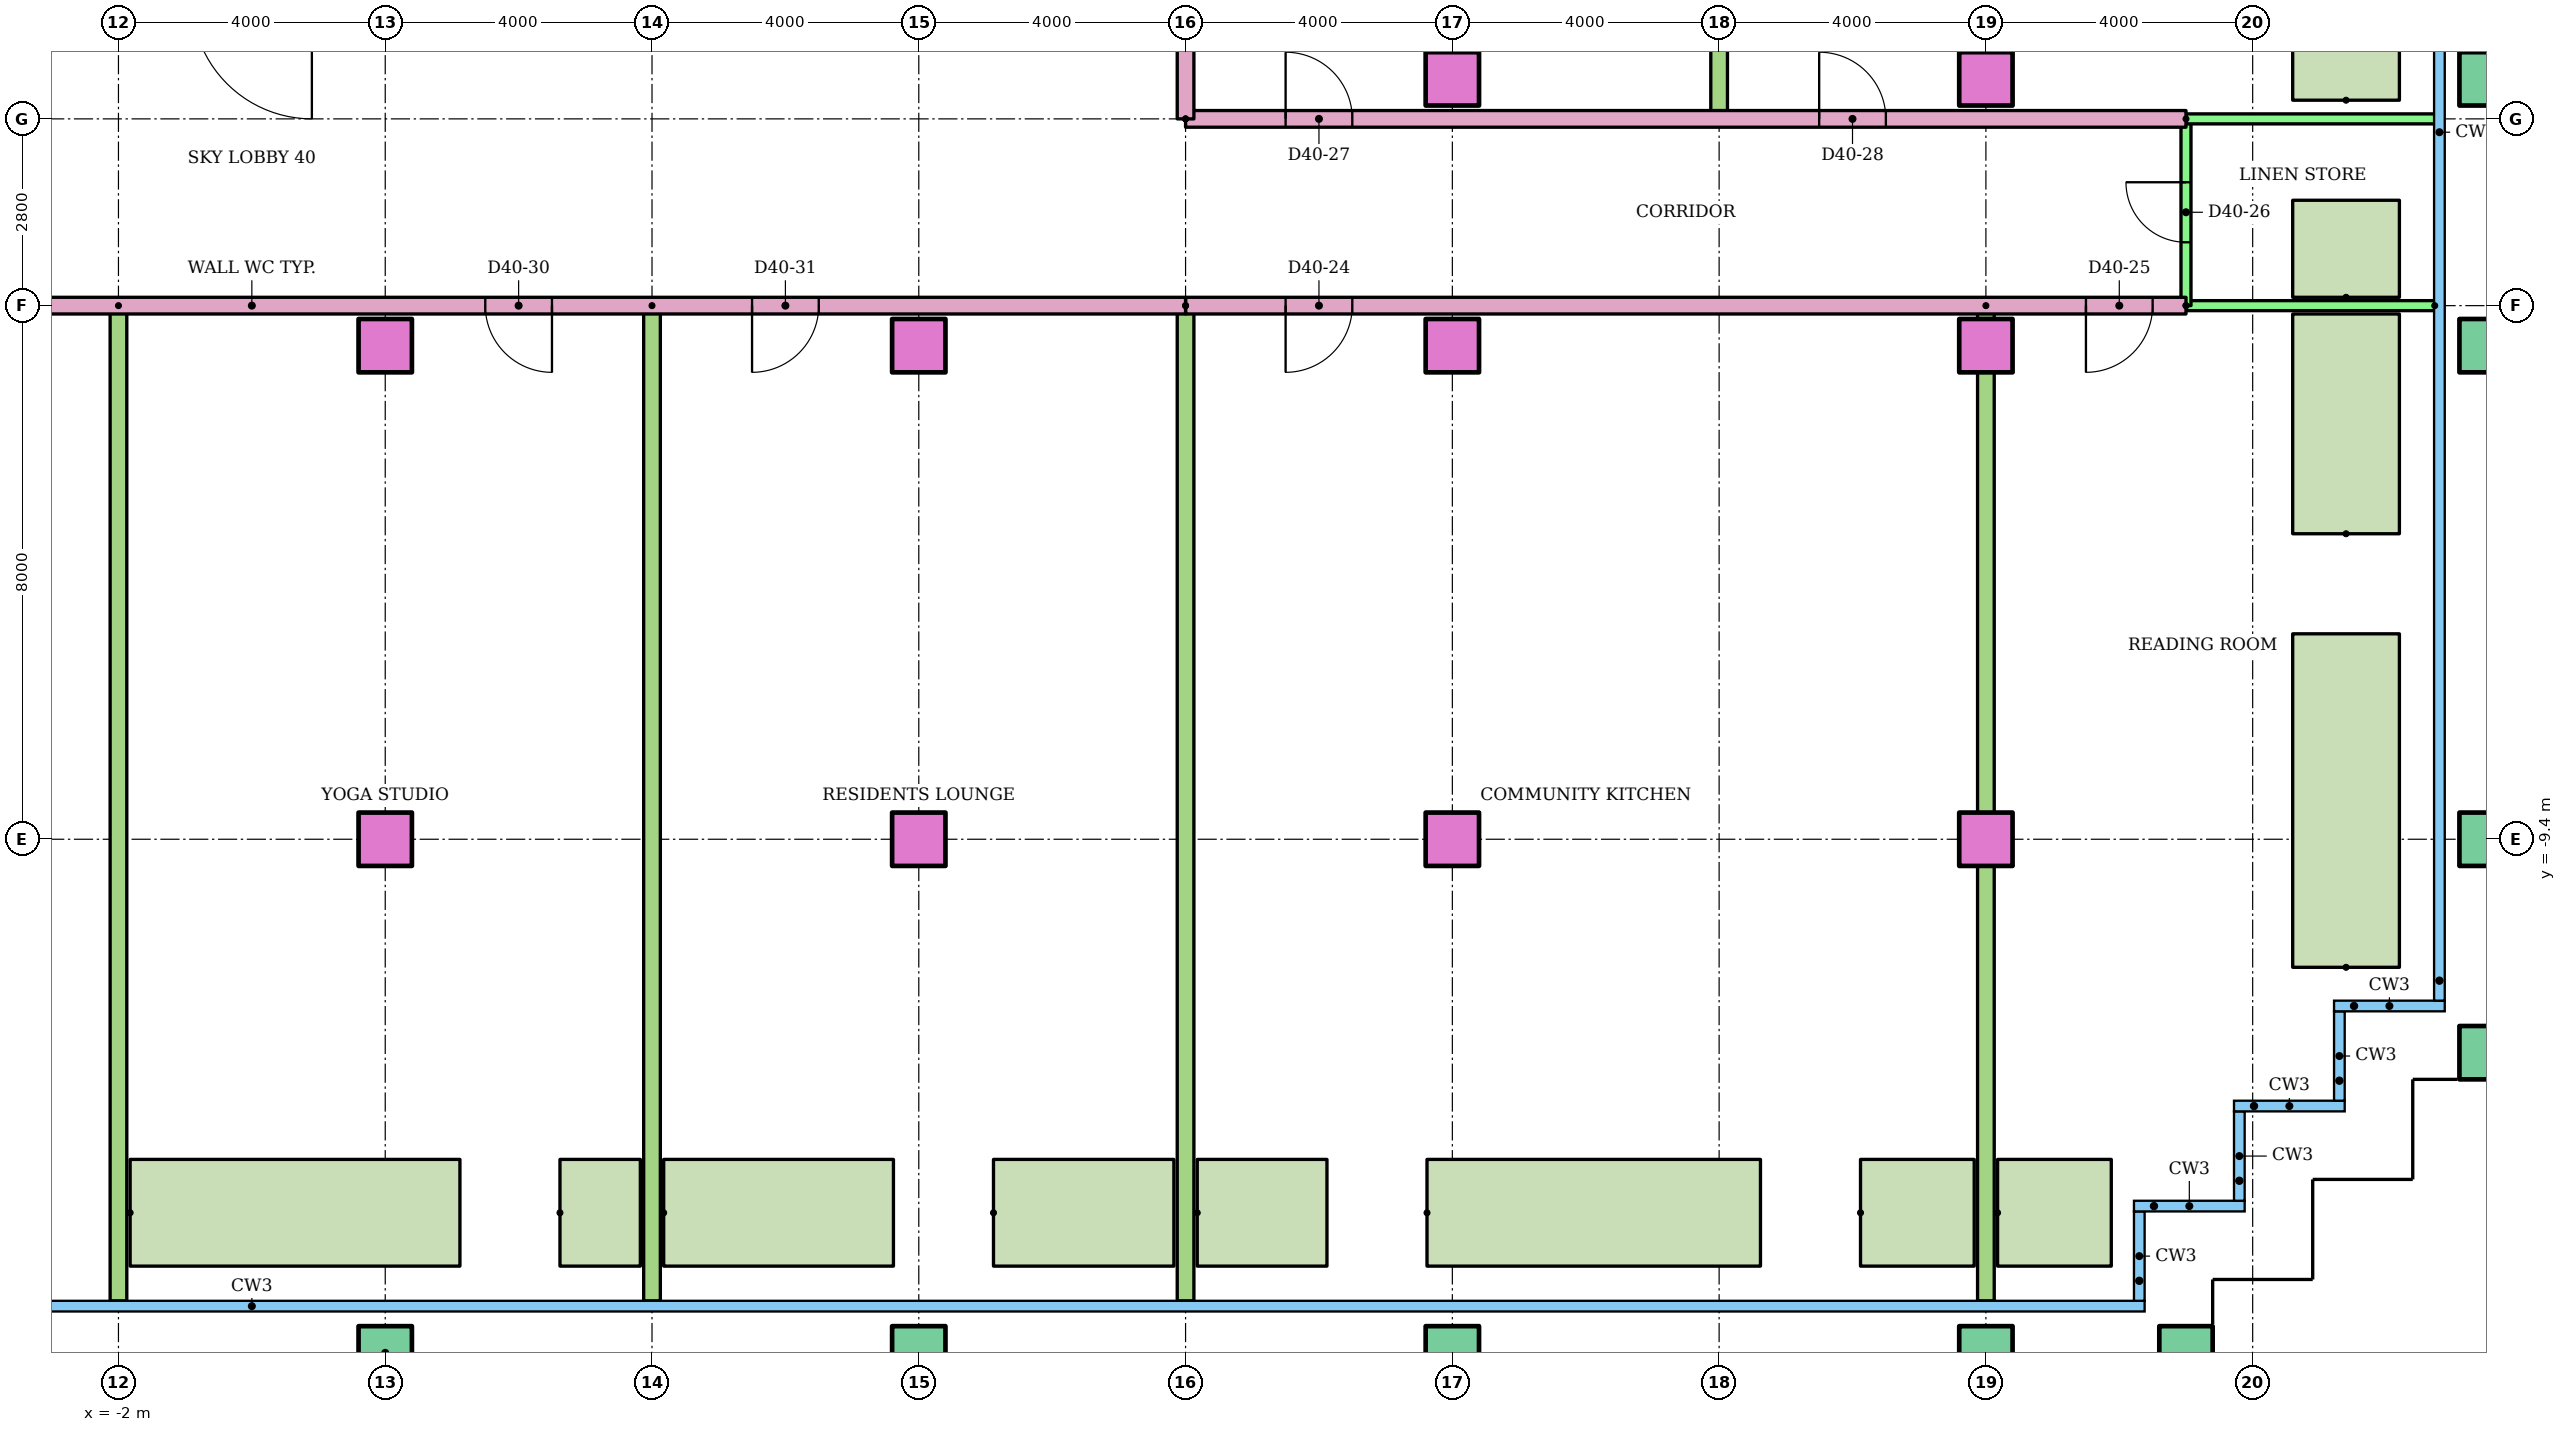
"""IFC4 building model, lengths in metres.
Left out: names, types, materials, properties, quantities, classifications, styles, units other than length and angle.
Written with IfcOpenShell. Run it as: python <this file> out.ifc"""

import sys

from ifc_helpers import new_model, si_unit, direction, frame, frame_2d, origin, origin_2d, place, context, subcontext, project, spatial, rectangle, hollow_rectangle, extrude, element, fill, save


model = new_model("IFC4")
c1 = context("Model", 3, precision=1e-05, world=origin(), true_north=direction((0.0, 1.0)))
c2 = subcontext(c1, "Body", "Model", "MODEL_VIEW")
j1 = project(units=[si_unit("LENGTHUNIT", "METRE"), si_unit("PLANEANGLEUNIT", "RADIAN")], contexts=[c1])
p1 = place(None, origin())
s1 = spatial("IfcSite", under=j1, at=p1, CompositionType="ELEMENT")
p2 = place(p1, origin())
s2 = spatial("IfcBuilding", under=s1, at=p2, CompositionType="ELEMENT")
p3 = place(p2, frame((0.0, 0.0, 151.8)))
s3 = spatial("IfcBuildingStorey", under=s2, at=p3, CompositionType="ELEMENT", Elevation=151.8)
for number, where in (
    (1, (2.0, -17.1, 0.0)),
    (2, (10.0, -17.1, 0.0)),
    (3, (18.0, -17.1, 0.0)),
    (4, (26.0, -17.1, 0.0)),
):
    element("IfcColumn", number, at=place(p3, frame(where)), inside=s3, PredefinedType="COLUMN", context=c2, shape_type="SweptSolid", body=[
        extrude(hollow_rectangle(XDim=0.8, YDim=0.8, WallThickness=0.04, at=origin_2d()), origin(), (0.0, 0.0, 1.0), 9.6),
    ])
for number, where in (
    (5, (29.0, -17.1, 0.0)),
    (6, (33.5, -12.6, 0.0)),
):
    element("IfcColumn", number, at=place(p3, frame(where)), inside=s3, PredefinedType="COLUMN", context=c2, shape_type="SweptSolid", body=[
        extrude(hollow_rectangle(XDim=0.8, YDim=0.8, WallThickness=0.04, at=origin_2d()), origin(), (0.0, 0.0, 1.0), 8.8),
    ])
for number, where in (
    (7, (2.0, -9.4, 0.0)),
    (8, (10.0, -9.4, 0.0)),
    (9, (18.0, -9.4, 0.0)),
    (10, (26.0, -9.4, 0.0)),
):
    element("IfcColumn", number, at=place(p3, frame(where)), inside=s3, PredefinedType="COLUMN", context=c2, shape_type="SweptSolid", body=[
        extrude(rectangle(XDim=0.8, YDim=0.8, at=origin_2d()), origin(), (0.0, 0.0, 1.0), 9.6),
    ])
p4 = place(p3, frame((33.5, -9.4, 0.0)))
e11 = element("IfcColumn", 11, at=p4, inside=s3, PredefinedType="COLUMN", context=c2, shape_type="SweptSolid", body=[
    extrude(hollow_rectangle(XDim=0.8, YDim=0.8, WallThickness=0.04, at=origin_2d()), origin(), (0.0, 0.0, 1.0), 8.8),
])
for number, where in (
    (12, (2.0, -2.0, 0.0)),
    (13, (10.0, -2.0, 0.0)),
    (14, (18.0, -2.0, 0.0)),
    (15, (26.0, -2.0, 0.0)),
):
    element("IfcColumn", number, at=place(p3, frame(where)), inside=s3, PredefinedType="COLUMN", context=c2, shape_type="SweptSolid", body=[
        extrude(rectangle(XDim=0.8, YDim=0.8, at=origin_2d()), origin(), (0.0, 0.0, 1.0), 9.6),
    ])
p5 = place(p3, frame((33.5, -2.0, 0.0)))
e16 = element("IfcColumn", 16, at=p5, inside=s3, PredefinedType="COLUMN", context=c2, shape_type="SweptSolid", body=[
    extrude(hollow_rectangle(XDim=0.8, YDim=0.8, WallThickness=0.04, at=origin_2d()), origin(), (0.0, 0.0, 1.0), 8.8),
])
for number, where in (
    (17, (18.0, 2.0, 0.0)),
    (18, (26.0, 2.0, 0.0)),
):
    element("IfcColumn", number, at=place(p3, frame(where)), inside=s3, PredefinedType="COLUMN", context=c2, shape_type="SweptSolid", body=[
        extrude(rectangle(XDim=0.8, YDim=0.8, at=origin_2d()), origin(), (0.0, 0.0, 1.0), 9.6),
    ])
p6 = place(p3, frame((33.5, 2.0, 0.0)))
e19 = element("IfcColumn", 19, at=p6, inside=s3, PredefinedType="COLUMN", context=c2, shape_type="SweptSolid", body=[
    extrude(hollow_rectangle(XDim=0.8, YDim=0.8, WallThickness=0.04, at=origin_2d()), origin(), (0.0, 0.0, 1.0), 8.8),
])
p7 = place(p3, frame((17.62, -15.0, 0.0)))
e20 = element("IfcWall", 20, at=p7, inside=s3, PredefinedType="STANDARD", context=c2, shape_type="SweptSolid", body=[
    extrude(rectangle(XDim=5.0, YDim=1.6, at=frame_2d((2.5, 0.0))), origin(), (0.0, 0.0, 1.0), 0.8),
])
for number, where, z_axis, x_axis in (
    (21, (31.4, -11.32, 0.0), (0.0, 0.0, 1.0), (0.0, 1.0, 0.0)),
    (22, (31.4, 1.68, 0.0), (0.0, 0.0, 1.0), (0.0, 1.0, 0.0)),
):
    element("IfcWall", number, at=place(p3, frame(where, z_axis=z_axis, x_axis=x_axis)), inside=s3, PredefinedType="STANDARD", context=c2, shape_type="SweptSolid", body=[
        extrude(rectangle(XDim=5.0, YDim=1.6, at=frame_2d((2.5, 0.0))), origin(), (0.0, 0.0, 1.0), 0.8),
    ])
p8 = place(p3, frame((29.0, -1.4, 0.0), z_axis=(0.0, 0.0, 1.0), x_axis=(-1.0, 0.0, 0.0)))
e23 = element("IfcWall", 23, at=p8, inside=s3, PredefinedType="PARTITIONING", context=c2, shape_type="SweptSolid", body=[
    extrude(rectangle(XDim=15.0, YDim=0.25, at=frame_2d((7.5, 0.0))), origin(), (0.0, 0.0, 1.0), 8.8),
])
p9 = place(p8, frame((12.5, 0.0, 0.0)))
e24 = element("IfcOpeningElement", 24, at=p9, cuts=e23, PredefinedType="OPENING", context=c2, shape_type="SweptSolid", body=[
    extrude(rectangle(XDim=1.0, YDim=2.1, at=frame_2d((0.5, 1.05))), frame((0.0, 0.135, 0.0), z_axis=(0.0, -1.0, 0.0), x_axis=(1.0, 0.0, 0.0)), (0.0, 0.0, 1.0), 0.27),
])
p10 = place(p8, frame((0.5, 0.0, 0.0)))
e25 = element("IfcOpeningElement", 25, at=p10, cuts=e23, PredefinedType="OPENING", context=c2, shape_type="SweptSolid", body=[
    extrude(rectangle(XDim=1.0, YDim=2.1, at=frame_2d((0.5, 1.05))), frame((0.0, 0.135, 0.0), z_axis=(0.0, -1.0, 0.0), x_axis=(1.0, 0.0, 0.0)), (0.0, 0.0, 1.0), 0.27),
])
p11 = place(p3, frame((32.73, -1.4, 0.0), z_axis=(0.0, 0.0, 1.0), x_axis=(-1.0, 0.0, 0.0)))
e26 = element("IfcWall", 26, at=p11, inside=s3, PredefinedType="PARTITIONING", context=c2, shape_type="SweptSolid", body=[
    extrude(rectangle(XDim=3.73, YDim=0.15, at=frame_2d((1.865, 0.0))), origin(), (0.0, 0.0, 1.0), 8.8),
])
p12 = place(p3, frame((29.0, -1.4, 0.0), z_axis=(0.0, 0.0, 1.0), x_axis=(0.0, 1.0, 0.0)))
e27 = element("IfcWall", 27, at=p12, inside=s3, PredefinedType="PARTITIONING", context=c2, shape_type="SweptSolid", body=[
    extrude(rectangle(XDim=2.8, YDim=0.15, at=frame_2d((1.4, 0.0))), origin(), (0.0, 0.0, 1.0), 8.8),
])
p13 = place(p12, frame((0.95, 0.0, 0.0)))
e28 = element("IfcOpeningElement", 28, at=p13, cuts=e27, PredefinedType="OPENING", context=c2, shape_type="SweptSolid", body=[
    extrude(rectangle(XDim=0.9, YDim=2.1, at=frame_2d((0.45, 1.05))), frame((0.0, 0.085, 0.0), z_axis=(0.0, -1.0, 0.0), x_axis=(1.0, 0.0, 0.0)), (0.0, 0.0, 1.0), 0.17),
])
for number, where, z_axis, x_axis in (
    (29, (14.0, -1.4, 0.0), (0.0, 0.0, 1.0), (0.0, -1.0, 0.0)),
    (30, (26.0, -1.4, 0.0), (0.0, 0.0, 1.0), (0.0, -1.0, 0.0)),
):
    element("IfcWall", number, at=place(p3, frame(where, z_axis=z_axis, x_axis=x_axis)), inside=s3, PredefinedType="PARTITIONING", context=c2, shape_type="SweptSolid", body=[
        extrude(rectangle(XDim=14.921, YDim=0.25, at=frame_2d((7.46, 0.0))), origin(), (0.0, 0.0, 1.0), 8.8),
    ])
p14 = place(p3, frame((14.0, 1.4, 0.0)))
e31 = element("IfcWall", 31, at=p14, inside=s3, PredefinedType="PARTITIONING", context=c2, shape_type="SweptSolid", body=[
    extrude(rectangle(XDim=15.0, YDim=0.25, at=frame_2d((7.5, 0.0))), origin(), (0.0, 0.0, 1.0), 8.8),
])
p15 = place(p14, frame((1.5, 0.0, 0.0)))
e32 = element("IfcOpeningElement", 32, at=p15, cuts=e31, PredefinedType="OPENING", context=c2, shape_type="SweptSolid", body=[
    extrude(rectangle(XDim=1.0, YDim=2.1, at=frame_2d((0.5, 1.05))), frame((0.0, 0.135, 0.0), z_axis=(0.0, -1.0, 0.0), x_axis=(1.0, 0.0, 0.0)), (0.0, 0.0, 1.0), 0.27),
])
p16 = place(p14, frame((9.5, 0.0, 0.0)))
e33 = element("IfcOpeningElement", 33, at=p16, cuts=e31, PredefinedType="OPENING", context=c2, shape_type="SweptSolid", body=[
    extrude(rectangle(XDim=1.0, YDim=2.1, at=frame_2d((0.5, 1.05))), frame((0.0, 0.135, 0.0), z_axis=(0.0, -1.0, 0.0), x_axis=(1.0, 0.0, 0.0)), (0.0, 0.0, 1.0), 0.27),
])
p17 = place(p3, frame((29.0, 1.4, 0.0)))
e34 = element("IfcWall", 34, at=p17, inside=s3, PredefinedType="PARTITIONING", context=c2, shape_type="SweptSolid", body=[
    extrude(rectangle(XDim=3.73, YDim=0.15, at=frame_2d((1.865, 0.0))), origin(), (0.0, 0.0, 1.0), 8.8),
])
p18 = place(p3, frame((22.0, 18.721, 0.0), z_axis=(0.0, 0.0, 1.0), x_axis=(0.0, -1.0, 0.0)))
e35 = element("IfcWall", 35, at=p18, inside=s3, PredefinedType="PARTITIONING", context=c2, shape_type="SweptSolid", body=[
    extrude(rectangle(XDim=17.321, YDim=0.25, at=frame_2d((8.661, 0.0))), origin(), (0.0, 0.0, 1.0), 8.8),
])
for number, where, z_axis, x_axis in (
    (36, (-2.0, -1.4, 0.0), (0.0, 0.0, 1.0), (0.0, -1.0, 0.0)),
    (37, (6.0, -1.4, 0.0), (0.0, 0.0, 1.0), (0.0, -1.0, 0.0)),
):
    element("IfcWall", number, at=place(p3, frame(where, z_axis=z_axis, x_axis=x_axis)), inside=s3, PredefinedType="PARTITIONING", context=c2, shape_type="SweptSolid", body=[
        extrude(rectangle(XDim=14.921, YDim=0.25, at=frame_2d((7.46, 0.0))), origin(), (0.0, 0.0, 1.0), 8.8),
    ])
p19 = place(p3, frame((14.0, -1.4, 0.0), z_axis=(0.0, 0.0, 1.0), x_axis=(-1.0, 0.0, 0.0)))
e38 = element("IfcWall", 38, at=p19, inside=s3, PredefinedType="PARTITIONING", context=c2, shape_type="SweptSolid", body=[
    extrude(rectangle(XDim=28.0, YDim=0.25, at=frame_2d((14.0, 0.0))), origin(), (0.0, 0.0, 1.0), 8.8),
])
p20 = place(p19, frame((25.5, 0.0, 0.0)))
e39 = element("IfcOpeningElement", 39, at=p20, cuts=e38, PredefinedType="OPENING", context=c2, shape_type="SweptSolid", body=[
    extrude(rectangle(XDim=1.0, YDim=2.1, at=frame_2d((0.5, 1.05))), frame((0.0, 0.135, 0.0), z_axis=(0.0, -1.0, 0.0), x_axis=(1.0, 0.0, 0.0)), (0.0, 0.0, 1.0), 0.27),
])
p21 = place(p19, frame((9.5, 0.0, 0.0)))
e40 = element("IfcOpeningElement", 40, at=p21, cuts=e38, PredefinedType="OPENING", context=c2, shape_type="SweptSolid", body=[
    extrude(rectangle(XDim=1.0, YDim=2.1, at=frame_2d((0.5, 1.05))), frame((0.0, 0.135, 0.0), z_axis=(0.0, -1.0, 0.0), x_axis=(1.0, 0.0, 0.0)), (0.0, 0.0, 1.0), 0.27),
])
p22 = place(p19, frame((5.5, 0.0, 0.0)))
e41 = element("IfcOpeningElement", 41, at=p22, cuts=e38, PredefinedType="OPENING", context=c2, shape_type="SweptSolid", body=[
    extrude(rectangle(XDim=1.0, YDim=2.1, at=frame_2d((0.5, 1.05))), frame((0.0, 0.135, 0.0), z_axis=(0.0, -1.0, 0.0), x_axis=(1.0, 0.0, 0.0)), (0.0, 0.0, 1.0), 0.27),
])
p23 = place(p3, frame((14.0, 1.4, 0.0), z_axis=(0.0, 0.0, 1.0), x_axis=(0.0, 1.0, 0.0)))
e42 = element("IfcWall", 42, at=p23, inside=s3, PredefinedType="PARTITIONING", context=c2, shape_type="SweptSolid", body=[
    extrude(rectangle(XDim=1.6, YDim=0.25, at=frame_2d((0.8, 0.0))), origin(), (0.0, 0.0, 1.0), 8.8),
])
p24 = place(p3, frame((-1.825, -15.0, 0.0)))
e43 = element("IfcWall", 43, at=p24, inside=s3, PredefinedType="STANDARD", context=c2, shape_type="SweptSolid", body=[
    extrude(rectangle(XDim=4.945, YDim=1.6, at=frame_2d((2.473, 0.0))), origin(), (0.0, 0.0, 1.0), 0.8),
])
p25 = place(p3, frame((4.62, -15.0, 0.0)))
e44 = element("IfcWall", 44, at=p25, inside=s3, PredefinedType="STANDARD", context=c2, shape_type="SweptSolid", body=[
    extrude(rectangle(XDim=1.205, YDim=1.6, at=frame_2d((0.603, 0.0))), origin(), (0.0, 0.0, 1.0), 0.8),
])
p26 = place(p3, frame((6.175, -15.0, 0.0)))
e45 = element("IfcWall", 45, at=p26, inside=s3, PredefinedType="STANDARD", context=c2, shape_type="SweptSolid", body=[
    extrude(rectangle(XDim=3.445, YDim=1.6, at=frame_2d((1.723, 0.0))), origin(), (0.0, 0.0, 1.0), 0.8),
])
p27 = place(p3, frame((11.12, -15.0, 0.0)))
e46 = element("IfcWall", 46, at=p27, inside=s3, PredefinedType="STANDARD", context=c2, shape_type="SweptSolid", body=[
    extrude(rectangle(XDim=2.705, YDim=1.6, at=frame_2d((1.353, 0.0))), origin(), (0.0, 0.0, 1.0), 0.8),
])
p28 = place(p3, frame((14.175, -15.0, 0.0)))
e47 = element("IfcWall", 47, at=p28, inside=s3, PredefinedType="STANDARD", context=c2, shape_type="SweptSolid", body=[
    extrude(rectangle(XDim=1.945, YDim=1.6, at=frame_2d((0.973, 0.0))), origin(), (0.0, 0.0, 1.0), 0.8),
])
for number, where in (
    (48, (24.12, -15.0, 0.0)),
    (49, (26.175, -15.0, 0.0)),
):
    element("IfcWall", number, at=place(p3, frame(where)), inside=s3, PredefinedType="STANDARD", context=c2, shape_type="SweptSolid", body=[
        extrude(rectangle(XDim=1.705, YDim=1.6, at=frame_2d((0.853, 0.0))), origin(), (0.0, 0.0, 1.0), 0.8),
    ])
p29 = place(p3, frame((31.4, -4.82, 0.0), z_axis=(0.0, 0.0, 1.0), x_axis=(0.0, 1.0, 0.0)))
e50 = element("IfcWall", 50, at=p29, inside=s3, PredefinedType="STANDARD", context=c2, shape_type="SweptSolid", body=[
    extrude(rectangle(XDim=3.295, YDim=1.6, at=frame_2d((1.647, 0.0))), origin(), (0.0, 0.0, 1.0), 0.8),
])
p30 = place(p3, frame((31.4, -1.275, 0.0), z_axis=(0.0, 0.0, 1.0), x_axis=(0.0, 1.0, 0.0)))
e51 = element("IfcWall", 51, at=p30, inside=s3, PredefinedType="STANDARD", context=c2, shape_type="SweptSolid", body=[
    extrude(rectangle(XDim=1.455, YDim=1.6, at=frame_2d((0.728, 0.0))), origin(), (0.0, 0.0, 1.0), 0.8),
])
p31 = place(p9, origin())
e52 = element("IfcDoor", 52, at=p31, inside=s3, OperationType="SINGLE_SWING_RIGHT", PredefinedType="DOOR", context=c2, shape_type="SweptSolid", body=[
    extrude(rectangle(XDim=1.0, YDim=2.1, at=frame_2d((0.5, 1.05))), frame((0.0, 0.025, 0.0), z_axis=(0.0, -1.0, 0.0), x_axis=(1.0, 0.0, 0.0)), (0.0, 0.0, 1.0), 0.05),
])
fill(e24, e52)
p32 = place(p10, origin())
e53 = element("IfcDoor", 53, at=p32, inside=s3, OperationType="SINGLE_SWING_RIGHT", PredefinedType="DOOR", context=c2, shape_type="SweptSolid", body=[
    extrude(rectangle(XDim=1.0, YDim=2.1, at=frame_2d((0.5, 1.05))), frame((0.0, 0.025, 0.0), z_axis=(0.0, -1.0, 0.0), x_axis=(1.0, 0.0, 0.0)), (0.0, 0.0, 1.0), 0.05),
])
fill(e25, e53)
p33 = place(p13, origin())
e54 = element("IfcDoor", 54, at=p33, inside=s3, OperationType="SINGLE_SWING_RIGHT", PredefinedType="DOOR", context=c2, shape_type="SweptSolid", body=[
    extrude(rectangle(XDim=0.9, YDim=2.1, at=frame_2d((0.45, 1.05))), frame((0.0, 0.025, 0.0), z_axis=(0.0, -1.0, 0.0), x_axis=(1.0, 0.0, 0.0)), (0.0, 0.0, 1.0), 0.05),
])
fill(e28, e54)
p34 = place(p15, origin())
e55 = element("IfcDoor", 55, at=p34, inside=s3, OperationType="SINGLE_SWING_LEFT", PredefinedType="DOOR", context=c2, shape_type="SweptSolid", body=[
    extrude(rectangle(XDim=1.0, YDim=2.1, at=frame_2d((0.5, 1.05))), frame((0.0, 0.025, 0.0), z_axis=(0.0, -1.0, 0.0), x_axis=(1.0, 0.0, 0.0)), (0.0, 0.0, 1.0), 0.05),
])
fill(e32, e55)
p35 = place(p16, origin())
e56 = element("IfcDoor", 56, at=p35, inside=s3, OperationType="SINGLE_SWING_LEFT", PredefinedType="DOOR", context=c2, shape_type="SweptSolid", body=[
    extrude(rectangle(XDim=1.0, YDim=2.1, at=frame_2d((0.5, 1.05))), frame((0.0, 0.025, 0.0), z_axis=(0.0, -1.0, 0.0), x_axis=(1.0, 0.0, 0.0)), (0.0, 0.0, 1.0), 0.05),
])
fill(e33, e56)
p36 = place(p21, origin())
e57 = element("IfcDoor", 57, at=p36, inside=s3, OperationType="SINGLE_SWING_LEFT", PredefinedType="DOOR", context=c2, shape_type="SweptSolid", body=[
    extrude(rectangle(XDim=1.0, YDim=2.1, at=frame_2d((0.5, 1.05))), frame((0.0, 0.025, 0.0), z_axis=(0.0, -1.0, 0.0), x_axis=(1.0, 0.0, 0.0)), (0.0, 0.0, 1.0), 0.05),
])
fill(e40, e57)
p37 = place(p22, origin())
e58 = element("IfcDoor", 58, at=p37, inside=s3, OperationType="SINGLE_SWING_RIGHT", PredefinedType="DOOR", context=c2, shape_type="SweptSolid", body=[
    extrude(rectangle(XDim=1.0, YDim=2.1, at=frame_2d((0.5, 1.05))), frame((0.0, 0.025, 0.0), z_axis=(0.0, -1.0, 0.0), x_axis=(1.0, 0.0, 0.0)), (0.0, 0.0, 1.0), 0.05),
])
fill(e41, e58)
save(model, sys.argv[1])
